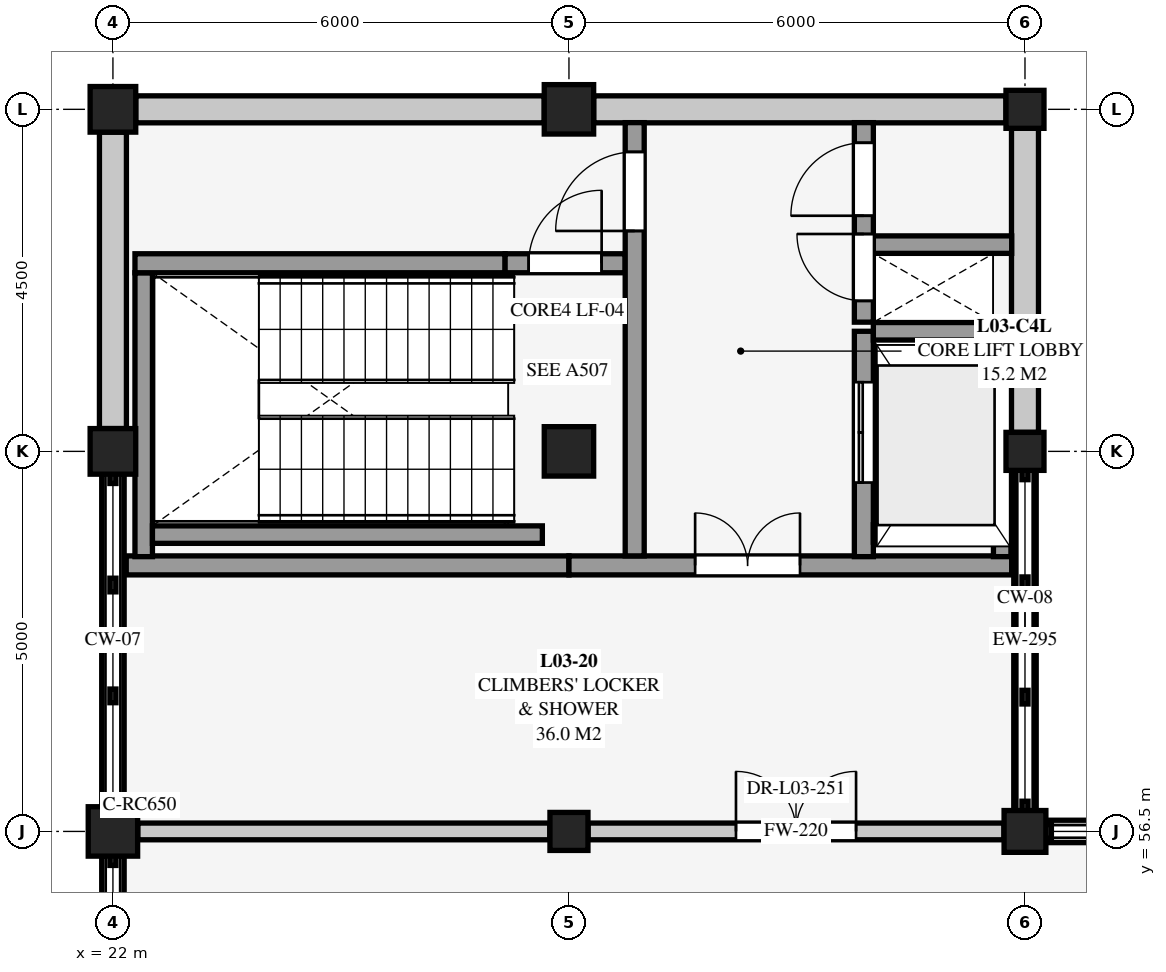
"""IFC4 building model, lengths in metres.
Left out: names, types, materials, properties, quantities, classifications, styles, units other than length and angle.
Written with IfcOpenShell. Run it as: python <this file> out.ifc"""

import sys

from ifc_helpers import new_model, si_unit, direction, frame, frame_2d, origin, origin_2d, place, context, subcontext, project, spatial, rectangle, extrude, element, fill, save


model = new_model("IFC4")
c1 = context("Model", 3, precision=1e-05, world=origin(), true_north=direction((0.0, 1.0)))
c2 = subcontext(c1, "Body", "Model", "MODEL_VIEW")
j1 = project(units=[si_unit("LENGTHUNIT", "METRE"), si_unit("PLANEANGLEUNIT", "RADIAN")], contexts=[c1])
p1 = place(None, origin())
s1 = spatial("IfcSite", under=j1, at=p1, CompositionType="ELEMENT")
p2 = place(p1, origin())
s2 = spatial("IfcBuilding", under=s1, at=p2, CompositionType="ELEMENT")
p3 = place(p2, frame((0.0, 0.0, 9.0)))
s3 = spatial("IfcBuildingStorey", under=s2, at=p3, CompositionType="ELEMENT", Elevation=9.0)
p4 = place(p3, frame((22.0, 56.5, 0.0), z_axis=(0.0, 0.0, 1.0), x_axis=(1.0, 0.0, 0.0)))
e1 = element("IfcColumn", 1, at=p4, inside=s3, PredefinedType="COLUMN", context=c2, shape_type="SweptSolid", body=[
    extrude(rectangle(XDim=0.65, YDim=0.65, at=origin_2d()), origin(), (0.0, 0.0, 1.0), 4.5),
])
for number, where, z_axis, x_axis in (
    (2, (22.0, 61.5, 0.0), (0.0, 0.0, 1.0), (1.0, 0.0, 0.0)),
    (3, (22.0, 66.0, 0.0), (0.0, 0.0, 1.0), (1.0, 0.0, 0.0)),
):
    element("IfcColumn", number, at=place(p3, frame(where, z_axis=z_axis, x_axis=x_axis)), inside=s3, PredefinedType="COLUMN", context=c2, shape_type="SweptSolid", body=[
        extrude(rectangle(XDim=0.6, YDim=0.6, at=origin_2d()), origin(), (0.0, 0.0, 1.0), 4.5),
    ])
p5 = place(p3, frame((28.0, 56.5, 0.0), z_axis=(0.0, 0.0, 1.0), x_axis=(1.0, 0.0, 0.0)))
e4 = element("IfcColumn", 4, at=p5, inside=s3, PredefinedType="COLUMN", context=c2, shape_type="SweptSolid", body=[
    extrude(rectangle(XDim=0.5, YDim=0.5, at=origin_2d()), origin(), (0.0, 0.0, 1.0), 4.5),
])
for number, where, z_axis, x_axis in (
    (5, (28.0, 61.5, 0.0), (0.0, 0.0, 1.0), (1.0, 0.0, 0.0)),
    (6, (28.0, 66.0, 0.0), (0.0, 0.0, 1.0), (1.0, 0.0, 0.0)),
):
    element("IfcColumn", number, at=place(p3, frame(where, z_axis=z_axis, x_axis=x_axis)), inside=s3, PredefinedType="COLUMN", context=c2, shape_type="SweptSolid", body=[
        extrude(rectangle(XDim=0.65, YDim=0.65, at=origin_2d()), origin(), (0.0, 0.0, 1.0), 4.5),
    ])
p6 = place(p3, frame((34.0, 56.5, 0.0), z_axis=(0.0, 0.0, 1.0), x_axis=(1.0, 0.0, 0.0)))
e7 = element("IfcColumn", 7, at=p6, inside=s3, PredefinedType="COLUMN", context=c2, shape_type="SweptSolid", body=[
    extrude(rectangle(XDim=0.55, YDim=0.55, at=origin_2d()), origin(), (0.0, 0.0, 1.0), 4.5),
])
for number, where, z_axis, x_axis in (
    (8, (34.0, 61.5, 0.0), (0.0, 0.0, 1.0), (1.0, 0.0, 0.0)),
    (9, (34.0, 66.0, 0.0), (0.0, 0.0, 1.0), (1.0, 0.0, 0.0)),
):
    element("IfcColumn", number, at=place(p3, frame(where, z_axis=z_axis, x_axis=x_axis)), inside=s3, PredefinedType="COLUMN", context=c2, shape_type="SweptSolid", body=[
        extrude(rectangle(XDim=0.5, YDim=0.5, at=origin_2d()), origin(), (0.0, 0.0, 1.0), 4.5),
    ])
p7 = place(p3, frame((34.275, 56.5, 0.0), z_axis=(0.0, 0.0, 1.0), x_axis=(1.0, 0.0, 0.0)))
e10 = element("IfcWall", 10, at=p7, inside=s3, PredefinedType="SOLIDWALL", context=c2, shape_type="SweptSolid", body=[
    extrude(rectangle(XDim=5.4, YDim=0.295, at=frame_2d((2.7, 0.0))), origin(), (0.0, 0.0, 1.0), 0.21),
])
p8 = place(p3, frame((22.0, 51.25, 0.0), z_axis=(0.0, 0.0, 1.0), x_axis=(0.0, 1.0, 0.0)))
e11 = element("IfcWall", 11, at=p8, inside=s3, PredefinedType="SOLIDWALL", context=c2, shape_type="SweptSolid", body=[
    extrude(rectangle(XDim=4.925, YDim=0.295, at=frame_2d((2.462, 0.0))), origin(), (0.0, 0.0, 1.0), 0.41),
])
p9 = place(p3, frame((22.3, 66.0, 0.0), z_axis=(0.0, 0.0, 1.0), x_axis=(1.0, 0.0, 0.0)))
e12 = element("IfcWall", 12, at=p9, inside=s3, PredefinedType="SOLIDWALL", context=c2, shape_type="SweptSolid", body=[
    extrude(rectangle(XDim=5.375, YDim=0.355, at=frame_2d((2.688, 0.0))), origin(), (0.0, 0.0, 1.0), 3.857),
])
p10 = place(p3, frame((28.325, 66.0, 0.0), z_axis=(0.0, 0.0, 1.0), x_axis=(1.0, 0.0, 0.0)))
e13 = element("IfcWall", 13, at=p10, inside=s3, PredefinedType="SOLIDWALL", context=c2, shape_type="SweptSolid", body=[
    extrude(rectangle(XDim=5.425, YDim=0.355, at=frame_2d((2.712, 0.0))), origin(), (0.0, 0.0, 1.0), 3.857),
])
p11 = place(p3, frame((22.0, 56.825, 0.0), z_axis=(0.0, 0.0, 1.0), x_axis=(0.0, 1.0, 0.0)))
e14 = element("IfcWall", 14, at=p11, inside=s3, PredefinedType="SOLIDWALL", context=c2, shape_type="SweptSolid", body=[
    extrude(rectangle(XDim=4.375, YDim=0.295, at=frame_2d((2.188, 0.0))), origin(), (0.0, 0.0, 1.0), 0.46),
])
p12 = place(p3, frame((34.0, 61.25, 0.0), z_axis=(0.0, 0.0, 1.0), x_axis=(0.0, -1.0, 0.0)))
e15 = element("IfcWall", 15, at=p12, inside=s3, PredefinedType="SOLIDWALL", context=c2, shape_type="SweptSolid", body=[
    extrude(rectangle(XDim=4.475, YDim=0.295, at=frame_2d((2.238, 0.0))), origin(), (0.0, 0.0, 1.0), 0.52),
])
p13 = place(p3, frame((22.0, 61.8, 0.0), z_axis=(0.0, 0.0, 1.0), x_axis=(0.0, 1.0, 0.0)))
e16 = element("IfcWall", 16, at=p13, inside=s3, PredefinedType="SOLIDWALL", context=c2, shape_type="SweptSolid", body=[
    extrude(rectangle(XDim=3.9, YDim=0.355, at=frame_2d((1.95, 0.0))), origin(), (0.0, 0.0, 1.0), 3.857),
])
p14 = place(p3, frame((34.0, 65.75, 0.0), z_axis=(0.0, 0.0, 1.0), x_axis=(0.0, -1.0, 0.0)))
e17 = element("IfcWall", 17, at=p14, inside=s3, PredefinedType="SOLIDWALL", context=c2, shape_type="SweptSolid", body=[
    extrude(rectangle(XDim=4.0, YDim=0.355, at=frame_2d((2.0, 0.0))), origin(), (0.0, 0.0, 1.0), 3.857),
])
p15 = place(p3, frame((22.175, 60.0, 0.0), z_axis=(0.0, 0.0, 1.0), x_axis=(1.0, 0.0, 0.0)))
e18 = element("IfcWall", 18, at=p15, inside=s3, PredefinedType="SHEAR", context=c2, shape_type="SweptSolid", body=[
    extrude(rectangle(XDim=5.825, YDim=0.25, at=frame_2d((2.913, 0.0))), origin(), (0.0, 0.0, 1.0), 4.264),
])
p16 = place(p3, frame((28.0, 60.0, 0.0), z_axis=(0.0, 0.0, 1.0), x_axis=(1.0, 0.0, 0.0)))
e19 = element("IfcWall", 19, at=p16, inside=s3, PredefinedType="SHEAR", context=c2, shape_type="SweptSolid", body=[
    extrude(rectangle(XDim=5.825, YDim=0.25, at=frame_2d((2.913, 0.0))), origin(), (0.0, 0.0, 1.0), 4.264),
])
p17 = place(p16, frame((1.66, 0.0, 0.0)))
e20 = element("IfcOpeningElement", 20, at=p17, cuts=e19, PredefinedType="OPENING", context=c2, shape_type="SweptSolid", body=[
    extrude(rectangle(XDim=1.38, YDim=2.16, at=frame_2d((0.69, 1.08))), frame((0.0, 0.135, 0.0), z_axis=(0.0, -1.0, 0.0), x_axis=(1.0, 0.0, 0.0)), (0.0, 0.0, 1.0), 0.27),
])
p18 = place(p3, frame((22.405, 60.115, 0.0), z_axis=(0.0, 0.0, 1.0), x_axis=(0.0, 1.0, 0.0)))
e21 = element("IfcWall", 21, at=p18, inside=s3, PredefinedType="SHEAR", context=c2, shape_type="SweptSolid", body=[
    extrude(rectangle(XDim=3.735, YDim=0.23, at=frame_2d((1.868, 0.0))), origin(), (0.0, 0.0, 1.0), 4.5),
])
p19 = place(p3, frame((22.52, 60.405, 0.0), z_axis=(0.0, 0.0, 1.0), x_axis=(1.0, 0.0, 0.0)))
e22 = element("IfcWall", 22, at=p19, inside=s3, PredefinedType="SHEAR", context=c2, shape_type="SweptSolid", body=[
    extrude(rectangle(XDim=5.13, YDim=0.23, at=frame_2d((2.565, 0.0))), origin(), (0.0, 0.0, 1.0), 4.5),
])
p20 = place(p3, frame((22.29, 63.975, 0.0), z_axis=(0.0, 0.0, 1.0), x_axis=(1.0, 0.0, 0.0)))
e23 = element("IfcWall", 23, at=p20, inside=s3, PredefinedType="SHEAR", context=c2, shape_type="SweptSolid", body=[
    extrude(rectangle(XDim=4.87, YDim=0.25, at=frame_2d((2.435, 0.0))), origin(), (0.0, 0.0, 1.0), 4.5),
])
p21 = place(p3, frame((27.16, 63.975, 0.0), z_axis=(0.0, 0.0, 1.0), x_axis=(1.0, 0.0, 0.0)))
e24 = element("IfcWall", 24, at=p21, inside=s3, PredefinedType="SHEAR", context=c2, shape_type="SweptSolid", body=[
    extrude(rectangle(XDim=1.58, YDim=0.25, at=frame_2d((0.79, 0.0))), origin(), (0.0, 0.0, 1.0), 4.264),
])
p22 = place(p21, frame((0.31, 0.0, 0.0)))
e25 = element("IfcOpeningElement", 25, at=p22, cuts=e24, PredefinedType="OPENING", context=c2, shape_type="SweptSolid", body=[
    extrude(rectangle(XDim=0.96, YDim=2.12, at=frame_2d((0.48, 1.06))), frame((0.0, 0.135, 0.0), z_axis=(0.0, -1.0, 0.0), x_axis=(1.0, 0.0, 0.0)), (0.0, 0.0, 1.0), 0.27),
])
p23 = place(p3, frame((28.865, 60.125, 0.0), z_axis=(0.0, 0.0, 1.0), x_axis=(0.0, 1.0, 0.0)))
e26 = element("IfcWall", 26, at=p23, inside=s3, PredefinedType="SHEAR", context=c2, shape_type="SweptSolid", body=[
    extrude(rectangle(XDim=5.7, YDim=0.25, at=frame_2d((2.85, 0.0))), origin(), (0.0, 0.0, 1.0), 4.264),
])
p24 = place(p23, frame((4.275, 0.0, 0.0)))
e27 = element("IfcOpeningElement", 27, at=p24, cuts=e26, PredefinedType="OPENING", context=c2, shape_type="SweptSolid", body=[
    extrude(rectangle(XDim=1.04, YDim=2.14, at=frame_2d((0.52, 1.07))), frame((0.0, 0.135, 0.0), z_axis=(0.0, -1.0, 0.0), x_axis=(1.0, 0.0, 0.0)), (0.0, 0.0, 1.0), 0.27),
])
p25 = place(p3, frame((31.88, 60.115, 0.0), z_axis=(0.0, 0.0, 1.0), x_axis=(0.0, 1.0, 0.0)))
e28 = element("IfcWall", 28, at=p25, inside=s3, PredefinedType="SHEAR", context=c2, shape_type="SweptSolid", body=[
    extrude(rectangle(XDim=2.965, YDim=0.25, at=frame_2d((1.482, 0.0))), origin(), (0.0, 0.0, 1.0), 4.5),
])
p26 = place(p25, frame((0.975, 0.0, 0.0)))
e29 = element("IfcOpeningElement", 29, at=p26, cuts=e28, PredefinedType="OPENING", context=c2, shape_type="SweptSolid", body=[
    extrude(rectangle(XDim=1.32, YDim=2.2, at=frame_2d((0.66, 1.1))), frame((0.0, 0.135, 0.0), z_axis=(0.0, -1.0, 0.0), x_axis=(1.0, 0.0, 0.0)), (0.0, 0.0, 1.0), 0.27),
])
p27 = place(p3, frame((32.005, 60.42, 0.0), z_axis=(0.0, 0.0, 1.0), x_axis=(1.0, 0.0, 0.0)))
e30 = element("IfcWall", 30, at=p27, inside=s3, PredefinedType="SHEAR", context=c2, shape_type="SweptSolid", body=[
    extrude(rectangle(XDim=1.58, YDim=0.23, at=frame_2d((0.79, 0.0))), origin(), (0.0, 0.0, 1.0), 4.5),
])
p28 = place(p3, frame((33.7, 60.115, 0.0), z_axis=(0.0, 0.0, 1.0), x_axis=(0.0, 1.0, 0.0)))
e31 = element("IfcWall", 31, at=p28, inside=s3, PredefinedType="SHEAR", context=c2, shape_type="SweptSolid", body=[
    extrude(rectangle(XDim=2.965, YDim=0.23, at=frame_2d((1.482, 0.0))), origin(), (0.0, 0.0, 1.0), 4.5),
])
p29 = place(p3, frame((32.005, 63.08, 0.0), z_axis=(0.0, 0.0, 1.0), x_axis=(1.0, 0.0, 0.0)))
e32 = element("IfcWall", 32, at=p29, inside=s3, PredefinedType="SHEAR", context=c2, shape_type="SweptSolid", body=[
    extrude(rectangle(XDim=1.58, YDim=0.23, at=frame_2d((0.79, 0.0))), origin(), (0.0, 0.0, 1.0), 4.5),
])
p30 = place(p3, frame((31.88, 63.2, 0.0), z_axis=(0.0, 0.0, 1.0), x_axis=(0.0, 1.0, 0.0)))
e33 = element("IfcWall", 33, at=p30, inside=s3, PredefinedType="SHEAR", context=c2, shape_type="SweptSolid", body=[
    extrude(rectangle(XDim=2.625, YDim=0.25, at=frame_2d((1.312, 0.0))), origin(), (0.0, 0.0, 1.0), 4.264),
])
p31 = place(p30, frame((0.28, 0.0, 0.0)))
e34 = element("IfcOpeningElement", 34, at=p31, cuts=e33, PredefinedType="OPENING", context=c2, shape_type="SweptSolid", body=[
    extrude(rectangle(XDim=0.88, YDim=2.08, at=frame_2d((0.44, 1.04))), frame((0.0, 0.135, 0.0), z_axis=(0.0, -1.0, 0.0), x_axis=(1.0, 0.0, 0.0)), (0.0, 0.0, 1.0), 0.27),
])
p32 = place(p30, frame((1.4, 0.0, 0.0)))
e35 = element("IfcOpeningElement", 35, at=p32, cuts=e33, PredefinedType="OPENING", context=c2, shape_type="SweptSolid", body=[
    extrude(rectangle(XDim=0.96, YDim=2.12, at=frame_2d((0.48, 1.06))), frame((0.0, 0.135, 0.0), z_axis=(0.0, -1.0, 0.0), x_axis=(1.0, 0.0, 0.0)), (0.0, 0.0, 1.0), 0.27),
])
p33 = place(p3, frame((32.005, 64.22, 0.0), z_axis=(0.0, 0.0, 1.0), x_axis=(1.0, 0.0, 0.0)))
e36 = element("IfcWall", 36, at=p33, inside=s3, PredefinedType="SHEAR", context=c2, shape_type="SweptSolid", body=[
    extrude(rectangle(XDim=1.82, YDim=0.23, at=frame_2d((0.91, 0.0))), origin(), (0.0, 0.0, 1.0), 4.264),
])
p34 = place(p3, frame((28.252, 56.5, 0.0), z_axis=(0.0, 0.0, 1.0), x_axis=(1.0, 0.0, 0.0)))
e37 = element("IfcWall", 37, at=p34, inside=s3, PredefinedType="SOLIDWALL", context=c2, shape_type="SweptSolid", body=[
    extrude(rectangle(XDim=5.471, YDim=0.22, at=frame_2d((2.735, 0.0))), origin(), (0.0, 0.0, 1.0), 3.725),
])
p35 = place(p34, frame((1.946, 0.0, 0.0)))
e38 = element("IfcOpeningElement", 38, at=p35, cuts=e37, PredefinedType="OPENING", context=c2, shape_type="SweptSolid", body=[
    extrude(rectangle(XDim=1.58, YDim=2.2, at=frame_2d((0.79, 1.1))), frame((0.0, 0.12, 0.0), z_axis=(0.0, -1.0, 0.0), x_axis=(1.0, 0.0, 0.0)), (0.0, 0.0, 1.0), 0.24),
])
p36 = place(p3, frame((22.327, 56.5, 0.0), z_axis=(0.0, 0.0, 1.0), x_axis=(1.0, 0.0, 0.0)))
e39 = element("IfcWall", 39, at=p36, inside=s3, PredefinedType="SOLIDWALL", context=c2, shape_type="SweptSolid", body=[
    extrude(rectangle(XDim=5.421, YDim=0.22, at=frame_2d((2.71, 0.0))), origin(), (0.0, 0.0, 1.0), 3.801),
])
p37 = place(p17, origin())
e40 = element("IfcDoor", 40, at=p37, inside=s3, OperationType="DOUBLE_DOOR_SINGLE_SWING", PredefinedType="DOOR", context=c2, shape_type="SweptSolid", body=[
    extrude(rectangle(XDim=1.38, YDim=2.16, at=frame_2d((0.69, 1.08))), frame((0.0, 0.025, 0.0), z_axis=(0.0, -1.0, 0.0), x_axis=(1.0, 0.0, 0.0)), (0.0, 0.0, 1.0), 0.05),
])
fill(e20, e40)
p38 = place(p22, origin())
e41 = element("IfcDoor", 41, at=p38, inside=s3, OperationType="SINGLE_SWING_RIGHT", PredefinedType="DOOR", context=c2, shape_type="SweptSolid", body=[
    extrude(rectangle(XDim=0.96, YDim=2.12, at=frame_2d((0.48, 1.06))), frame((0.0, 0.025, 0.0), z_axis=(0.0, -1.0, 0.0), x_axis=(1.0, 0.0, 0.0)), (0.0, 0.0, 1.0), 0.05),
])
fill(e25, e41)
p39 = place(p24, origin())
e42 = element("IfcDoor", 42, at=p39, inside=s3, OperationType="SINGLE_SWING_LEFT", PredefinedType="DOOR", context=c2, shape_type="SweptSolid", body=[
    extrude(rectangle(XDim=1.04, YDim=2.14, at=frame_2d((0.52, 1.07))), frame((0.0, 0.025, 0.0), z_axis=(0.0, -1.0, 0.0), x_axis=(1.0, 0.0, 0.0)), (0.0, 0.0, 1.0), 0.05),
])
fill(e27, e42)
p40 = place(p26, origin())
e43 = element("IfcDoor", 43, at=p40, inside=s3, OperationType="DOUBLE_DOOR_SLIDING", PredefinedType="DOOR", context=c2, shape_type="SweptSolid", body=[
    extrude(rectangle(XDim=1.32, YDim=2.2, at=frame_2d((0.66, 1.1))), frame((0.0, 0.025, 0.0), z_axis=(0.0, -1.0, 0.0), x_axis=(1.0, 0.0, 0.0)), (0.0, 0.0, 1.0), 0.05),
])
fill(e29, e43)
p41 = place(p31, origin())
e44 = element("IfcDoor", 44, at=p41, inside=s3, OperationType="SINGLE_SWING_RIGHT", PredefinedType="DOOR", context=c2, shape_type="SweptSolid", body=[
    extrude(rectangle(XDim=0.88, YDim=2.08, at=frame_2d((0.44, 1.04))), frame((0.0, 0.025, 0.0), z_axis=(0.0, -1.0, 0.0), x_axis=(1.0, 0.0, 0.0)), (0.0, 0.0, 1.0), 0.05),
])
fill(e34, e44)
p42 = place(p32, origin())
e45 = element("IfcDoor", 45, at=p42, inside=s3, OperationType="SINGLE_SWING_LEFT", PredefinedType="DOOR", context=c2, shape_type="SweptSolid", body=[
    extrude(rectangle(XDim=0.96, YDim=2.12, at=frame_2d((0.48, 1.06))), frame((0.0, 0.025, 0.0), z_axis=(0.0, -1.0, 0.0), x_axis=(1.0, 0.0, 0.0)), (0.0, 0.0, 1.0), 0.05),
])
fill(e35, e45)
p43 = place(p35, origin())
e46 = element("IfcDoor", 46, at=p43, inside=s3, OperationType="DOUBLE_DOOR_SINGLE_SWING", PredefinedType="DOOR", context=c2, shape_type="SweptSolid", body=[
    extrude(rectangle(XDim=1.58, YDim=2.2, at=frame_2d((0.79, 1.1))), frame((0.0, 0.025, 0.0), z_axis=(0.0, -1.0, 0.0), x_axis=(1.0, 0.0, 0.0)), (0.0, 0.0, 1.0), 0.05),
])
fill(e38, e46)
save(model, sys.argv[1])
